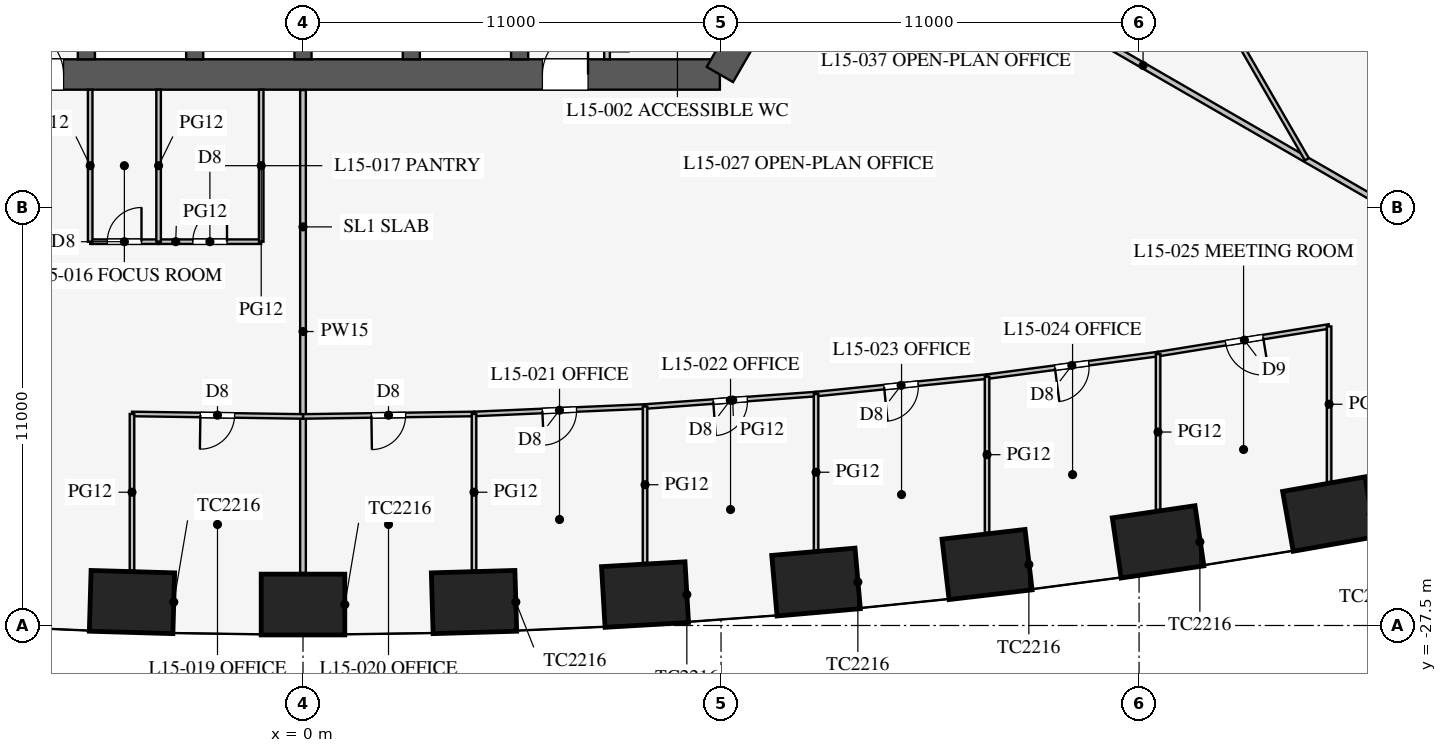
"""IFC4 building model, lengths in metres.
Left out: names, types, materials, properties, quantities, classifications, styles, units other than length and angle.
Written with IfcOpenShell. Run it as: python <this file> out.ifc"""

import sys

from ifc_helpers import new_model, si_unit, direction, frame, frame_2d, origin, origin_2d, place, context, subcontext, project, spatial, rectangle, extrude, element, fill, save


model = new_model("IFC4")
c1 = context("Model", 3, precision=1e-05, world=origin(), true_north=direction((0.0, 1.0)))
c2 = subcontext(c1, "Body", "Model", "MODEL_VIEW")
j1 = project(units=[si_unit("LENGTHUNIT", "METRE"), si_unit("PLANEANGLEUNIT", "RADIAN")], contexts=[c1])
p1 = place(None, origin())
s1 = spatial("IfcSite", under=j1, at=p1, CompositionType="ELEMENT")
p2 = place(p1, origin())
s2 = spatial("IfcBuilding", under=s1, at=p2, CompositionType="ELEMENT")
p3 = place(p2, frame((0.0, 0.0, 66.9)))
s3 = spatial("IfcBuildingStorey", under=s2, at=p3, CompositionType="ELEMENT", Elevation=66.9)
for number, where, z_axis, x_axis in (
    (1, (-4.5, -26.883, 0.0), (0.0, 0.0, 1.0), (1.0, -0.029, 0.0)),
    (2, (0.0, -26.949, 0.0), (0.0, 0.0, 1.0), (1.0, 0.0, 0.0)),
    (3, (4.5, -26.883, 0.0), (0.0, 0.0, 1.0), (1.0, 0.029, 0.0)),
    (4, (9.0, -26.686, 0.0), (0.0, 0.0, 1.0), (0.998, 0.058, 0.0)),
    (5, (13.5, -26.357, 0.0), (0.0, 0.0, 1.0), (0.996, 0.087, 0.0)),
    (6, (18.0, -25.895, 0.0), (0.0, 0.0, 1.0), (0.993, 0.116, 0.0)),
    (7, (22.5, -25.299, 0.0), (0.0, 0.0, 1.0), (0.989, 0.145, 0.0)),
    (8, (27.0, -24.568, 0.0), (0.0, 0.0, 1.0), (0.985, 0.174, 0.0)),
):
    element("IfcColumn", number, at=place(p3, frame(where, z_axis=z_axis, x_axis=x_axis)), inside=s3, PredefinedType="COLUMN", context=c2, shape_type="SweptSolid", body=[
        extrude(rectangle(XDim=2.2, YDim=1.6, at=origin_2d()), origin(), (0.0, 0.0, 1.0), 4.2),
    ])
p4 = place(p3, frame((-10.97, -13.0, 0.0), z_axis=(0.0, 0.0, 1.0), x_axis=(1.0, 0.0, 0.0)))
e9 = element("IfcWall", 9, at=p4, inside=s3, PredefinedType="SHEAR", context=c2, shape_type="SweptSolid", body=[
    extrude(rectangle(XDim=21.939, YDim=0.8, at=frame_2d((10.97, 0.0))), origin(), (0.0, 0.0, 1.0), 4.2),
])
p5 = place(p4, frame((17.27, 0.0, 0.0)))
e10 = element("IfcOpeningElement", 10, at=p5, cuts=e9, PredefinedType="OPENING", context=c2, shape_type="SweptSolid", body=[
    extrude(rectangle(XDim=1.2, YDim=2.1, at=frame_2d((0.6, 1.05))), frame((0.0, 0.41, 0.0), z_axis=(0.0, -1.0, 0.0), x_axis=(1.0, 0.0, 0.0)), (0.0, 0.0, 1.0), 0.82),
])
p6 = place(p4, frame((3.47, 0.0, 0.0)))
e11 = element("IfcOpeningElement", 11, at=p6, cuts=e9, PredefinedType="OPENING", context=c2, shape_type="SweptSolid", body=[
    extrude(rectangle(XDim=1.2, YDim=2.1, at=frame_2d((0.6, 1.05))), frame((0.0, 0.41, 0.0), z_axis=(0.0, -1.0, 0.0), x_axis=(1.0, 0.0, 0.0)), (0.0, 0.0, 1.0), 0.82),
])
p7 = place(p3, frame((10.97, -13.0, 0.0), z_axis=(0.0, 0.0, 1.0), x_axis=(0.499995765644, 0.866027848477, 0.0)))
e12 = element("IfcWall", 12, at=p7, inside=s3, PredefinedType="SHEAR", context=c2, shape_type="SweptSolid", body=[
    extrude(rectangle(XDim=11.547, YDim=0.8, at=frame_2d((5.773, 0.0))), origin(), (0.0, 0.0, 1.0), 4.2),
])
for number, where, z_axis, x_axis in (
    (13, (-5.7, -10.025, 0.0), (0.0, 0.0, 1.0), (0.0, -1.0, 0.0)),
    (14, (-2.85, -10.025, 0.0), (0.0, 0.0, 1.0), (0.0, -1.0, 0.0)),
    (15, (0.0, -10.025, 0.0), (0.0, 0.0, 1.0), (0.0, -1.0, 0.0)),
    (16, (2.85, -10.025, 0.0), (0.0, 0.0, 1.0), (0.0, -1.0, 0.0)),
    (17, (5.7, -10.025, 0.0), (0.0, 0.0, 1.0), (0.0, -1.0, 0.0)),
):
    element("IfcWall", number, at=place(p3, frame(where, z_axis=z_axis, x_axis=x_axis)), inside=s3, PredefinedType="SHEAR", context=c2, shape_type="SweptSolid", body=[
        extrude(rectangle(XDim=2.575, YDim=0.45, at=frame_2d((1.288, 0.0))), origin(), (0.0, 0.0, 1.0), 4.2),
    ])
p8 = place(p3, frame((8.0, -7.5, 0.0), z_axis=(0.0, 0.0, 1.0), x_axis=(0.0, -1.0, 0.0)))
e18 = element("IfcWall", 18, at=p8, inside=s3, PredefinedType="PARTITIONING", context=c2, shape_type="SweptSolid", body=[
    extrude(rectangle(XDim=5.1, YDim=0.15, at=frame_2d((2.55, 0.0))), origin(), (0.0, 0.0, 1.0), 4.0),
])
p9 = place(p8, frame((2.6, 0.0, 0.0)))
e19 = element("IfcOpeningElement", 19, at=p9, cuts=e18, PredefinedType="OPENING", context=c2, shape_type="SweptSolid", body=[
    extrude(rectangle(XDim=0.9, YDim=2.1, at=frame_2d((0.45, 1.05))), frame((0.0, 0.085, 0.0), z_axis=(0.0, -1.0, 0.0), x_axis=(1.0, 0.0, 0.0)), (0.0, 0.0, 1.0), 0.17),
])
p10 = place(p3, frame((14.203, -8.2, 0.0), z_axis=(0.0, 0.0, 1.0), x_axis=(0.866024965723, -0.500000758745, 0.0)))
e20 = element("IfcWall", 20, at=p10, inside=s3, PredefinedType="PARTITIONING", context=c2, shape_type="SweptSolid", body=[
    extrude(rectangle(XDim=18.25, YDim=0.15, at=frame_2d((9.125, 0.0))), origin(), (0.0, 0.0, 1.0), 2.3),
])
p11 = place(p3, frame((0.0, -13.41, 0.0), z_axis=(0.0, 0.0, 1.0), x_axis=(0.0, -1.0, 0.0)))
e21 = element("IfcWall", 21, at=p11, inside=s3, PredefinedType="PARTITIONING", context=c2, shape_type="SweptSolid", body=[
    extrude(rectangle(XDim=12.709, YDim=0.15, at=frame_2d((6.354, 0.0))), origin(), (0.0, 0.0, 1.0), 2.8),
])
p12 = place(p3, frame((-3.8, -17.4, 0.0), z_axis=(0.0, 0.0, 1.0), x_axis=(1.0, 0.0, 0.0)))
e22 = element("IfcWall", 22, at=p12, inside=s3, PredefinedType="PARTITIONING", context=c2, shape_type="SweptSolid", body=[
    extrude(rectangle(XDim=2.7, YDim=0.12, at=frame_2d((1.35, 0.0))), origin(), (0.0, 0.0, 1.0), 2.9),
])
p13 = place(p12, frame((0.9, 0.0, 0.15)))
e23 = element("IfcOpeningElement", 23, at=p13, cuts=e22, PredefinedType="OPENING", context=c2, shape_type="SweptSolid", body=[
    extrude(rectangle(XDim=0.9, YDim=2.1, at=frame_2d((0.45, 1.05))), frame((0.0, 0.07, 0.0), z_axis=(0.0, -1.0, 0.0), x_axis=(1.0, 0.0, 0.0)), (0.0, 0.0, 1.0), 0.14),
])
p14 = place(p3, frame((-5.6, -17.4, 0.0), z_axis=(0.0, 0.0, 1.0), x_axis=(1.0, 0.0, 0.0)))
e24 = element("IfcWall", 24, at=p14, inside=s3, PredefinedType="PARTITIONING", context=c2, shape_type="SweptSolid", body=[
    extrude(rectangle(XDim=1.8, YDim=0.12, at=frame_2d((0.9, 0.0))), origin(), (0.0, 0.0, 1.0), 2.9),
])
p15 = place(p14, frame((0.45, 0.0, 0.15)))
e25 = element("IfcOpeningElement", 25, at=p15, cuts=e24, PredefinedType="OPENING", context=c2, shape_type="SweptSolid", body=[
    extrude(rectangle(XDim=0.9, YDim=2.1, at=frame_2d((0.45, 1.05))), frame((0.0, 0.07, 0.0), z_axis=(0.0, -1.0, 0.0), x_axis=(1.0, 0.0, 0.0)), (0.0, 0.0, 1.0), 0.14),
])
for number, where, z_axis, x_axis in (
    (26, (-1.1, -13.4, 0.0), (0.0, 0.0, 1.0), (0.0, -1.0, 0.0)),
    (27, (-3.8, -13.4, 0.0), (0.0, 0.0, 1.0), (0.0, -1.0, 0.0)),
    (28, (-5.6, -13.4, 0.0), (0.0, 0.0, 1.0), (0.0, -1.0, 0.0)),
):
    element("IfcWall", number, at=place(p3, frame(where, z_axis=z_axis, x_axis=x_axis)), inside=s3, PredefinedType="PARTITIONING", context=c2, shape_type="SweptSolid", body=[
        extrude(rectangle(XDim=4.0, YDim=0.12, at=frame_2d((2.0, 0.0))), origin(), (0.0, 0.0, 1.0), 2.9),
    ])
p16 = place(p3, frame((0.0, -21.999, 0.0), z_axis=(0.0, 0.0, 1.0), x_axis=(0.999894311967, 0.014538393859, 0.0)))
e29 = element("IfcWall", 29, at=p16, inside=s3, PredefinedType="PARTITIONING", context=c2, shape_type="SweptSolid", body=[
    extrude(rectangle(XDim=4.5, YDim=0.12, at=frame_2d((2.25, 0.0))), origin(), (0.0, 0.0, 1.0), 2.9),
])
p17 = place(p16, frame((1.8, 0.0, 0.15)))
e30 = element("IfcOpeningElement", 30, at=p17, cuts=e29, PredefinedType="OPENING", context=c2, shape_type="SweptSolid", body=[
    extrude(rectangle(XDim=0.9, YDim=2.1, at=frame_2d((0.45, 1.05))), frame((0.0, 0.07, 0.0), z_axis=(0.0, -1.0, 0.0), x_axis=(1.0, 0.0, 0.0)), (0.0, 0.0, 1.0), 0.14),
])
p18 = place(p3, frame((13.5, -21.41, 0.0), z_axis=(0.0, 0.0, 1.0), x_axis=(0.994833141332, 0.101523499286, 0.0)))
e31 = element("IfcWall", 31, at=p18, inside=s3, PredefinedType="PARTITIONING", context=c2, shape_type="SweptSolid", body=[
    extrude(rectangle(XDim=4.523, YDim=0.12, at=frame_2d((2.262, 0.0))), origin(), (0.0, 0.0, 1.0), 2.9),
])
p19 = place(p18, frame((1.8, 0.0, 0.15)))
e32 = element("IfcOpeningElement", 32, at=p19, cuts=e31, PredefinedType="OPENING", context=c2, shape_type="SweptSolid", body=[
    extrude(rectangle(XDim=0.9, YDim=2.1, at=frame_2d((0.45, 1.05))), frame((0.0, 0.07, 0.0), z_axis=(0.0, -1.0, 0.0), x_axis=(1.0, 0.0, 0.0)), (0.0, 0.0, 1.0), 0.14),
])
p20 = place(p3, frame((18.0, -20.951, 0.0), z_axis=(0.0, 0.0, 1.0), x_axis=(0.991435244698, 0.130599217346, 0.0)))
e33 = element("IfcWall", 33, at=p20, inside=s3, PredefinedType="PARTITIONING", context=c2, shape_type="SweptSolid", body=[
    extrude(rectangle(XDim=4.539, YDim=0.12, at=frame_2d((2.27, 0.0))), origin(), (0.0, 0.0, 1.0), 2.9),
])
p21 = place(p20, frame((1.8, 0.0, 0.15)))
e34 = element("IfcOpeningElement", 34, at=p21, cuts=e33, PredefinedType="OPENING", context=c2, shape_type="SweptSolid", body=[
    extrude(rectangle(XDim=0.9, YDim=2.1, at=frame_2d((0.45, 1.05))), frame((0.0, 0.07, 0.0), z_axis=(0.0, -1.0, 0.0), x_axis=(1.0, 0.0, 0.0)), (0.0, 0.0, 1.0), 0.14),
])
p22 = place(p3, frame((22.5, -20.358, 0.0), z_axis=(0.0, 0.0, 1.0), x_axis=(0.987181300889, 0.159602879593, 0.0)))
e35 = element("IfcWall", 35, at=p22, inside=s3, PredefinedType="PARTITIONING", context=c2, shape_type="SweptSolid", body=[
    extrude(rectangle(XDim=4.558, YDim=0.12, at=frame_2d((2.279, 0.0))), origin(), (0.0, 0.0, 1.0), 2.9),
])
p23 = place(p22, frame((1.8, 0.0, 0.15)))
e36 = element("IfcOpeningElement", 36, at=p23, cuts=e35, PredefinedType="OPENING", context=c2, shape_type="SweptSolid", body=[
    extrude(rectangle(XDim=1.0, YDim=2.1, at=frame_2d((0.5, 1.05))), frame((0.0, 0.07, 0.0), z_axis=(0.0, -1.0, 0.0), x_axis=(1.0, 0.0, 0.0)), (0.0, 0.0, 1.0), 0.14),
])
p24 = place(p3, frame((4.5, -21.933, 0.0), z_axis=(0.0, 0.0, 1.0), x_axis=(0.999052370647, 0.043524254212, 0.0)))
e37 = element("IfcWall", 37, at=p24, inside=s3, PredefinedType="PARTITIONING", context=c2, shape_type="SweptSolid", body=[
    extrude(rectangle(XDim=4.504, YDim=0.12, at=frame_2d((2.252, 0.0))), origin(), (0.0, 0.0, 1.0), 2.9),
])
p25 = place(p24, frame((1.8, 0.0, 0.15)))
e38 = element("IfcOpeningElement", 38, at=p25, cuts=e37, PredefinedType="OPENING", context=c2, shape_type="SweptSolid", body=[
    extrude(rectangle(XDim=0.9, YDim=2.1, at=frame_2d((0.45, 1.05))), frame((0.0, 0.07, 0.0), z_axis=(0.0, -1.0, 0.0), x_axis=(1.0, 0.0, 0.0)), (0.0, 0.0, 1.0), 0.14),
])
p26 = place(p3, frame((9.0, -21.737, 0.0), z_axis=(0.0, 0.0, 1.0), x_axis=(0.997363894896, 0.072562119306, 0.0)))
e39 = element("IfcWall", 39, at=p26, inside=s3, PredefinedType="PARTITIONING", context=c2, shape_type="SweptSolid", body=[
    extrude(rectangle(XDim=4.512, YDim=0.12, at=frame_2d((2.256, 0.0))), origin(), (0.0, 0.0, 1.0), 2.9),
])
p27 = place(p26, frame((1.8, 0.0, 0.15)))
e40 = element("IfcOpeningElement", 40, at=p27, cuts=e39, PredefinedType="OPENING", context=c2, shape_type="SweptSolid", body=[
    extrude(rectangle(XDim=0.9, YDim=2.1, at=frame_2d((0.45, 1.05))), frame((0.0, 0.07, 0.0), z_axis=(0.0, -1.0, 0.0), x_axis=(1.0, 0.0, 0.0)), (0.0, 0.0, 1.0), 0.14),
])
p28 = place(p3, frame((-4.5, -21.933, 0.0), z_axis=(0.0, 0.0, 1.0), x_axis=(0.999894311967, -0.014538393859, 0.0)))
e41 = element("IfcWall", 41, at=p28, inside=s3, PredefinedType="PARTITIONING", context=c2, shape_type="SweptSolid", body=[
    extrude(rectangle(XDim=4.5, YDim=0.12, at=frame_2d((2.25, 0.0))), origin(), (0.0, 0.0, 1.0), 2.9),
])
p29 = place(p28, frame((1.8, 0.0, 0.15)))
e42 = element("IfcOpeningElement", 42, at=p29, cuts=e41, PredefinedType="OPENING", context=c2, shape_type="SweptSolid", body=[
    extrude(rectangle(XDim=0.9, YDim=2.1, at=frame_2d((0.45, 1.05))), frame((0.0, 0.07, 0.0), z_axis=(0.0, -1.0, 0.0), x_axis=(1.0, 0.0, 0.0)), (0.0, 0.0, 1.0), 0.14),
])
p30 = place(p3, frame((13.5, -21.41, 0.0), z_axis=(0.0, 0.0, 1.0), x_axis=(0.0, -1.0, 0.0)))
e43 = element("IfcWall", 43, at=p30, inside=s3, PredefinedType="PARTITIONING", context=c2, shape_type="SweptSolid", body=[
    extrude(rectangle(XDim=4.114, YDim=0.12, at=frame_2d((2.057, 0.0))), origin(), (0.0, 0.0, 1.0), 2.6),
])
p31 = place(p3, frame((18.0, -20.951, 0.0), z_axis=(0.0, 0.0, 1.0), x_axis=(0.0, -1.0, 0.0)))
e44 = element("IfcWall", 44, at=p31, inside=s3, PredefinedType="PARTITIONING", context=c2, shape_type="SweptSolid", body=[
    extrude(rectangle(XDim=4.109, YDim=0.12, at=frame_2d((2.054, 0.0))), origin(), (0.0, 0.0, 1.0), 2.6),
])
p32 = place(p3, frame((22.5, -20.358, 0.0), z_axis=(0.0, 0.0, 1.0), x_axis=(0.0, -1.0, 0.0)))
e45 = element("IfcWall", 45, at=p32, inside=s3, PredefinedType="PARTITIONING", context=c2, shape_type="SweptSolid", body=[
    extrude(rectangle(XDim=4.103, YDim=0.12, at=frame_2d((2.051, 0.0))), origin(), (0.0, 0.0, 1.0), 2.8),
])
p33 = place(p3, frame((27.0, -19.63, 0.0), z_axis=(0.0, 0.0, 1.0), x_axis=(0.0, -1.0, 0.0)))
e46 = element("IfcWall", 46, at=p33, inside=s3, PredefinedType="PARTITIONING", context=c2, shape_type="SweptSolid", body=[
    extrude(rectangle(XDim=4.095, YDim=0.12, at=frame_2d((2.047, 0.0))), origin(), (0.0, 0.0, 1.0), 2.9),
])
p34 = place(p3, frame((4.5, -21.933, 0.0), z_axis=(0.0, 0.0, 1.0), x_axis=(0.0, -1.0, 0.0)))
e47 = element("IfcWall", 47, at=p34, inside=s3, PredefinedType="PARTITIONING", context=c2, shape_type="SweptSolid", body=[
    extrude(rectangle(XDim=4.119, YDim=0.12, at=frame_2d((2.06, 0.0))), origin(), (0.0, 0.0, 1.0), 2.8),
])
p35 = place(p3, frame((9.0, -21.737, 0.0), z_axis=(0.0, 0.0, 1.0), x_axis=(0.0, -1.0, 0.0)))
e48 = element("IfcWall", 48, at=p35, inside=s3, PredefinedType="PARTITIONING", context=c2, shape_type="SweptSolid", body=[
    extrude(rectangle(XDim=4.117, YDim=0.12, at=frame_2d((2.059, 0.0))), origin(), (0.0, 0.0, 1.0), 2.8),
])
p36 = place(p3, frame((-4.5, -21.933, 0.0), z_axis=(0.0, 0.0, 1.0), x_axis=(0.0, -1.0, 0.0)))
e49 = element("IfcWall", 49, at=p36, inside=s3, PredefinedType="PARTITIONING", context=c2, shape_type="SweptSolid", body=[
    extrude(rectangle(XDim=4.119, YDim=0.12, at=frame_2d((2.06, 0.0))), origin(), (0.0, 0.0, 1.0), 2.8),
])
p37 = place(p3, frame((26.415, -15.231, 0.0), z_axis=(0.0, 0.0, 1.0), x_axis=(-0.50000091641, 0.866024874695, 0.0)))
e50 = element("IfcWall", 50, at=p37, inside=s3, PredefinedType="PARTITIONING", context=c2, shape_type="SweptSolid", body=[
    extrude(rectangle(XDim=52.796, YDim=0.12, at=frame_2d((26.398, 0.0))), origin(), (0.0, 0.0, 1.0), 2.9),
])
p38 = place(p37, frame((10.2, 0.0, 0.15)))
e51 = element("IfcOpeningElement", 51, at=p38, cuts=e50, PredefinedType="OPENING", context=c2, shape_type="SweptSolid", body=[
    extrude(rectangle(XDim=1.8, YDim=2.1, at=frame_2d((0.9, 1.05))), frame((0.0, 0.07, 0.0), z_axis=(0.0, -1.0, 0.0), x_axis=(1.0, 0.0, 0.0)), (0.0, 0.0, 1.0), 0.14),
])
p39 = place(p37, frame((40.8, 0.0, 0.15)))
e52 = element("IfcOpeningElement", 52, at=p39, cuts=e50, PredefinedType="OPENING", context=c2, shape_type="SweptSolid", body=[
    extrude(rectangle(XDim=1.8, YDim=2.1, at=frame_2d((0.9, 1.05))), frame((0.0, 0.07, 0.0), z_axis=(0.0, -1.0, 0.0), x_axis=(1.0, 0.0, 0.0)), (0.0, 0.0, 1.0), 0.14),
])
p40 = place(p5, origin())
e53 = element("IfcDoor", 53, at=p40, inside=s3, OperationType="SINGLE_SWING_RIGHT", PredefinedType="DOOR", context=c2, shape_type="SweptSolid", body=[
    extrude(rectangle(XDim=1.2, YDim=2.1, at=frame_2d((0.6, 1.05))), frame((0.0, 0.025, 0.0), z_axis=(0.0, -1.0, 0.0), x_axis=(1.0, 0.0, 0.0)), (0.0, 0.0, 1.0), 0.05),
])
fill(e10, e53)
p41 = place(p6, origin())
e54 = element("IfcDoor", 54, at=p41, inside=s3, OperationType="SINGLE_SWING_LEFT", PredefinedType="DOOR", context=c2, shape_type="SweptSolid", body=[
    extrude(rectangle(XDim=1.2, YDim=2.1, at=frame_2d((0.6, 1.05))), frame((0.0, 0.025, 0.0), z_axis=(0.0, -1.0, 0.0), x_axis=(1.0, 0.0, 0.0)), (0.0, 0.0, 1.0), 0.05),
])
fill(e11, e54)
p42 = place(p15, origin())
e55 = element("IfcDoor", 55, at=p42, inside=s3, OperationType="SINGLE_SWING_RIGHT", PredefinedType="DOOR", context=c2, shape_type="SweptSolid", body=[
    extrude(rectangle(XDim=0.9, YDim=2.1, at=frame_2d((0.45, 1.05))), frame((0.0, 0.025, 0.0), z_axis=(0.0, -1.0, 0.0), x_axis=(1.0, 0.0, 0.0)), (0.0, 0.0, 1.0), 0.05),
])
fill(e25, e55)
p43 = place(p13, origin())
e56 = element("IfcDoor", 56, at=p43, inside=s3, OperationType="SINGLE_SWING_RIGHT", PredefinedType="DOOR", context=c2, shape_type="SweptSolid", body=[
    extrude(rectangle(XDim=0.9, YDim=2.1, at=frame_2d((0.45, 1.05))), frame((0.0, 0.025, 0.0), z_axis=(0.0, -1.0, 0.0), x_axis=(1.0, 0.0, 0.0)), (0.0, 0.0, 1.0), 0.05),
])
fill(e23, e56)
p44 = place(p29, frame((0.9, 0.0, 0.0), z_axis=(0.0, 0.0, 1.0), x_axis=(-1.0, 0.0, 0.0)))
e57 = element("IfcDoor", 57, at=p44, inside=s3, OperationType="SINGLE_SWING_RIGHT", PredefinedType="DOOR", context=c2, shape_type="SweptSolid", body=[
    extrude(rectangle(XDim=0.9, YDim=2.1, at=frame_2d((0.45, 1.05))), frame((0.0, 0.025, 0.0), z_axis=(0.0, -1.0, 0.0), x_axis=(1.0, 0.0, 0.0)), (0.0, 0.0, 1.0), 0.05),
])
fill(e42, e57)
p45 = place(p17, frame((0.9, 0.0, 0.0), z_axis=(0.0, 0.0, 1.0), x_axis=(-1.0, 0.0, 0.0)))
e58 = element("IfcDoor", 58, at=p45, inside=s3, OperationType="SINGLE_SWING_RIGHT", PredefinedType="DOOR", context=c2, shape_type="SweptSolid", body=[
    extrude(rectangle(XDim=0.9, YDim=2.1, at=frame_2d((0.45, 1.05))), frame((0.0, 0.025, 0.0), z_axis=(0.0, -1.0, 0.0), x_axis=(1.0, 0.0, 0.0)), (0.0, 0.0, 1.0), 0.05),
])
fill(e30, e58)
p46 = place(p25, frame((0.9, 0.0, 0.0), z_axis=(0.0, 0.0, 1.0), x_axis=(-1.0, 0.0, 0.0)))
e59 = element("IfcDoor", 59, at=p46, inside=s3, OperationType="SINGLE_SWING_RIGHT", PredefinedType="DOOR", context=c2, shape_type="SweptSolid", body=[
    extrude(rectangle(XDim=0.9, YDim=2.1, at=frame_2d((0.45, 1.05))), frame((0.0, 0.025, 0.0), z_axis=(0.0, -1.0, 0.0), x_axis=(1.0, 0.0, 0.0)), (0.0, 0.0, 1.0), 0.05),
])
fill(e38, e59)
p47 = place(p27, frame((0.9, 0.0, 0.0), z_axis=(0.0, 0.0, 1.0), x_axis=(-1.0, 0.0, 0.0)))
e60 = element("IfcDoor", 60, at=p47, inside=s3, OperationType="SINGLE_SWING_RIGHT", PredefinedType="DOOR", context=c2, shape_type="SweptSolid", body=[
    extrude(rectangle(XDim=0.9, YDim=2.1, at=frame_2d((0.45, 1.05))), frame((0.0, 0.025, 0.0), z_axis=(0.0, -1.0, 0.0), x_axis=(1.0, 0.0, 0.0)), (0.0, 0.0, 1.0), 0.05),
])
fill(e40, e60)
p48 = place(p19, frame((0.9, 0.0, 0.0), z_axis=(0.0, 0.0, 1.0), x_axis=(-1.0, 0.0, 0.0)))
e61 = element("IfcDoor", 61, at=p48, inside=s3, OperationType="SINGLE_SWING_RIGHT", PredefinedType="DOOR", context=c2, shape_type="SweptSolid", body=[
    extrude(rectangle(XDim=0.9, YDim=2.1, at=frame_2d((0.45, 1.05))), frame((0.0, 0.025, 0.0), z_axis=(0.0, -1.0, 0.0), x_axis=(1.0, 0.0, 0.0)), (0.0, 0.0, 1.0), 0.05),
])
fill(e32, e61)
p49 = place(p21, frame((0.9, 0.0, 0.0), z_axis=(0.0, 0.0, 1.0), x_axis=(-1.0, 0.0, 0.0)))
e62 = element("IfcDoor", 62, at=p49, inside=s3, OperationType="SINGLE_SWING_RIGHT", PredefinedType="DOOR", context=c2, shape_type="SweptSolid", body=[
    extrude(rectangle(XDim=0.9, YDim=2.1, at=frame_2d((0.45, 1.05))), frame((0.0, 0.025, 0.0), z_axis=(0.0, -1.0, 0.0), x_axis=(1.0, 0.0, 0.0)), (0.0, 0.0, 1.0), 0.05),
])
fill(e34, e62)
p50 = place(p23, frame((1.0, 0.0, 0.0), z_axis=(0.0, 0.0, 1.0), x_axis=(-1.0, 0.0, 0.0)))
e63 = element("IfcDoor", 63, at=p50, inside=s3, OperationType="SINGLE_SWING_LEFT", PredefinedType="DOOR", context=c2, shape_type="SweptSolid", body=[
    extrude(rectangle(XDim=1.0, YDim=2.1, at=frame_2d((0.5, 1.05))), frame((0.0, 0.025, 0.0), z_axis=(0.0, -1.0, 0.0), x_axis=(1.0, 0.0, 0.0)), (0.0, 0.0, 1.0), 0.05),
])
fill(e36, e63)
save(model, sys.argv[1])
